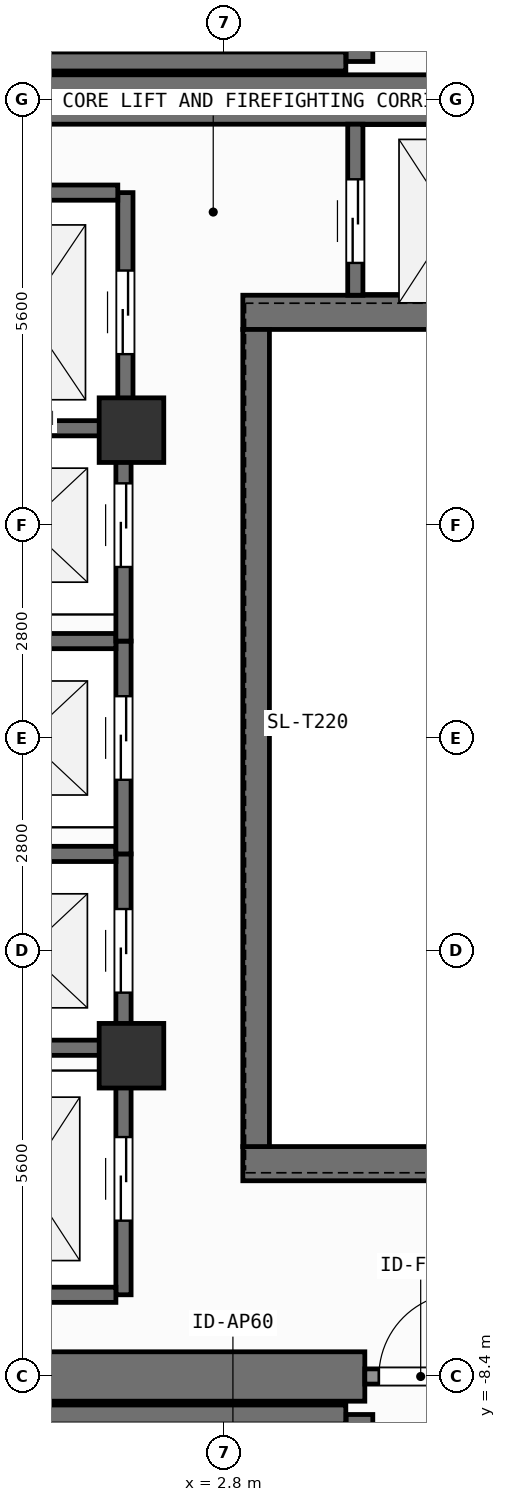
"""IFC4 building model, lengths in metres.
Left out: names, types, materials, properties, quantities, classifications, styles, units other than length and angle.
Written with IfcOpenShell. Run it as: python <this file> out.ifc"""

import sys

from ifc_helpers import new_model, si_unit, direction, frame, frame_2d, origin, origin_2d, place, context, subcontext, project, spatial, rectangle, extrude, element, fill, save


model = new_model("IFC4")
c1 = context("Model", 3, precision=1e-05, world=origin(), true_north=direction((0.0, 1.0)))
c2 = subcontext(c1, "Body", "Model", "MODEL_VIEW")
j1 = project(units=[si_unit("LENGTHUNIT", "METRE"), si_unit("PLANEANGLEUNIT", "RADIAN")], contexts=[c1])
p1 = place(None, origin())
s1 = spatial("IfcSite", under=j1, at=p1, CompositionType="ELEMENT")
p2 = place(p1, origin())
s2 = spatial("IfcBuilding", under=s1, at=p2, CompositionType="ELEMENT")
p3 = place(p2, frame((0.0, 0.0, 270.3)))
s3 = spatial("IfcBuildingStorey", under=s2, at=p3, CompositionType="ELEMENT", Elevation=270.3)
p4 = place(p3, frame((-2.62, -8.4, 0.0), z_axis=(0.0, 0.0, 1.0), x_axis=(1.0, 0.0, 0.0)))
e1 = element("IfcWall", 1, at=p4, inside=s3, PredefinedType="SHEAR", context=c2, shape_type="SweptSolid", body=[
    extrude(rectangle(XDim=7.27, YDim=0.65, at=frame_2d((3.635, 0.0))), origin(), (0.0, 0.0, 1.0), 3.9),
])
p5 = place(p3, frame((-7.55, 8.4, 0.0), z_axis=(0.0, 0.0, 1.0), x_axis=(1.0, 0.0, 0.0)))
e2 = element("IfcWall", 2, at=p5, inside=s3, PredefinedType="SHEAR", context=c2, shape_type="SweptSolid", body=[
    extrude(rectangle(XDim=16.275, YDim=0.65, at=frame_2d((8.138, 0.0))), origin(), (0.0, 0.0, 1.0), 3.9),
])
for number, where, z_axis, x_axis in (
    (3, (3.045, -5.6, 0.0), (0.0, 0.0, 1.0), (1.0, 0.0, 0.0)),
    (4, (3.045, 5.6, 0.0), (0.0, 0.0, 1.0), (1.0, 0.0, 0.0)),
):
    element("IfcWall", number, at=place(p3, frame(where, z_axis=z_axis, x_axis=x_axis)), inside=s3, PredefinedType="SHEAR", context=c2, shape_type="SweptSolid", body=[
        extrude(rectangle(XDim=5.68, YDim=0.45, at=frame_2d((2.84, 0.0))), origin(), (0.0, 0.0, 1.0), 3.9),
    ])
p6 = place(p3, frame((3.22, -5.375, 0.0), z_axis=(0.0, 0.0, 1.0), x_axis=(0.0, 1.0, 0.0)))
e5 = element("IfcWall", 5, at=p6, inside=s3, PredefinedType="SHEAR", context=c2, shape_type="SweptSolid", body=[
    extrude(rectangle(XDim=10.75, YDim=0.35, at=frame_2d((5.375, 0.0))), origin(), (0.0, 0.0, 1.0), 3.9),
])
p7 = place(p3, frame((-2.2, -8.9, 0.0), z_axis=(0.0, 0.0, 1.0), x_axis=(1.0, 0.0, 0.0)))
e6 = element("IfcWall", 6, at=p7, inside=s3, PredefinedType="SHEAR", context=c2, shape_type="SweptSolid", body=[
    extrude(rectangle(XDim=6.6, YDim=0.25, at=frame_2d((3.3, 0.0))), origin(), (0.0, 0.0, 1.0), 3.9),
])
p8 = place(p3, frame((4.58, -8.9, 0.0), z_axis=(0.0, 0.0, 1.0), x_axis=(0.0, -1.0, 0.0)))
e7 = element("IfcWall", 7, at=p8, inside=s3, PredefinedType="SHEAR", context=c2, shape_type="SweptSolid", body=[
    extrude(rectangle(XDim=2.925, YDim=0.35, at=frame_2d((1.462, 0.0))), origin(), (0.0, 0.0, 1.0), 3.9),
])
p9 = place(p8, frame((0.913, 0.0, 0.0)))
e8 = element("IfcOpeningElement", 8, at=p9, cuts=e7, PredefinedType="OPENING", context=c2, shape_type="SweptSolid", body=[
    extrude(rectangle(XDim=1.1, YDim=2.15, at=frame_2d((0.55, 1.075))), frame((0.0, 0.185, 0.0), z_axis=(0.0, -1.0, 0.0), x_axis=(1.0, 0.0, 0.0)), (0.0, 0.0, 1.0), 0.37),
])
p10 = place(p3, frame((-2.2, 8.9, 0.0), z_axis=(0.0, 0.0, 1.0), x_axis=(1.0, 0.0, 0.0)))
e9 = element("IfcWall", 9, at=p10, inside=s3, PredefinedType="SHEAR", context=c2, shape_type="SweptSolid", body=[
    extrude(rectangle(XDim=6.6, YDim=0.25, at=frame_2d((3.3, 0.0))), origin(), (0.0, 0.0, 1.0), 3.9),
])
p11 = place(p3, frame((4.58, 11.825, 0.0), z_axis=(0.0, 0.0, 1.0), x_axis=(0.0, -1.0, 0.0)))
e10 = element("IfcWall", 10, at=p11, inside=s3, PredefinedType="SHEAR", context=c2, shape_type="SweptSolid", body=[
    extrude(rectangle(XDim=2.925, YDim=0.35, at=frame_2d((1.462, 0.0))), origin(), (0.0, 0.0, 1.0), 3.9),
])
p12 = place(p11, frame((0.913, 0.0, 0.0)))
e11 = element("IfcOpeningElement", 11, at=p12, cuts=e10, PredefinedType="OPENING", context=c2, shape_type="SweptSolid", body=[
    extrude(rectangle(XDim=1.1, YDim=2.15, at=frame_2d((0.55, 1.075))), frame((0.0, 0.185, 0.0), z_axis=(0.0, -1.0, 0.0), x_axis=(1.0, 0.0, 0.0)), (0.0, 0.0, 1.0), 0.37),
])
for number, where, z_axis, x_axis in (
    (12, (1.58, -4.18, 0.0), (0.0, 0.0, 1.0), (1.0, 0.0, 0.0)),
    (13, (1.58, 4.05, 0.0), (0.0, 0.0, 1.0), (1.0, 0.0, 0.0)),
):
    element("IfcColumn", number, at=place(p3, frame(where, z_axis=z_axis, x_axis=x_axis)), inside=s3, PredefinedType="COLUMN", context=c2, shape_type="SweptSolid", body=[
        extrude(rectangle(XDim=0.85, YDim=0.85, at=origin_2d()), origin(), (0.0, 0.0, 1.0), 3.9),
    ])
p13 = place(p3, frame((1.475, -4.275, 0.0), z_axis=(0.0, 0.0, 1.0), x_axis=(0.0, 1.0, 0.0)))
e14 = element("IfcWall", 14, at=p13, inside=s3, PredefinedType="SHEAR", context=c2, shape_type="SweptSolid", body=[
    extrude(rectangle(XDim=2.75, YDim=0.2, at=frame_2d((1.375, 0.0))), origin(), (0.0, 0.0, 1.0), 3.68),
])
p14 = place(p13, frame((0.925, 0.0, 0.0)))
e15 = element("IfcOpeningElement", 15, at=p14, cuts=e14, PredefinedType="OPENING", context=c2, shape_type="SweptSolid", body=[
    extrude(rectangle(XDim=1.1, YDim=2.2, at=frame_2d((0.55, 1.1))), frame((0.0, 0.11, 0.0), z_axis=(0.0, -1.0, 0.0), x_axis=(1.0, 0.0, 0.0)), (0.0, 0.0, 1.0), 0.22),
])
for number, where, z_axis, x_axis in (
    (16, (-0.975, -4.075, 0.0), (0.0, 0.0, 1.0), (1.0, 0.0, 0.0)),
    (17, (-0.975, -1.525, 0.0), (0.0, 0.0, 1.0), (1.0, 0.0, 0.0)),
):
    element("IfcWall", number, at=place(p3, frame(where, z_axis=z_axis, x_axis=x_axis)), inside=s3, PredefinedType="SHEAR", context=c2, shape_type="SweptSolid", body=[
        extrude(rectangle(XDim=2.35, YDim=0.2, at=frame_2d((1.175, 0.0))), origin(), (0.0, 0.0, 1.0), 3.68),
    ])
p15 = place(p3, frame((1.475, -1.525, 0.0), z_axis=(0.0, 0.0, 1.0), x_axis=(0.0, 1.0, 0.0)))
e18 = element("IfcWall", 18, at=p15, inside=s3, PredefinedType="SHEAR", context=c2, shape_type="SweptSolid", body=[
    extrude(rectangle(XDim=2.8, YDim=0.2, at=frame_2d((1.4, 0.0))), origin(), (0.0, 0.0, 1.0), 3.68),
])
p16 = place(p15, frame((0.975, 0.0, 0.0)))
e19 = element("IfcOpeningElement", 19, at=p16, cuts=e18, PredefinedType="OPENING", context=c2, shape_type="SweptSolid", body=[
    extrude(rectangle(XDim=1.1, YDim=2.2, at=frame_2d((0.55, 1.1))), frame((0.0, 0.11, 0.0), z_axis=(0.0, -1.0, 0.0), x_axis=(1.0, 0.0, 0.0)), (0.0, 0.0, 1.0), 0.22),
])
p17 = place(p3, frame((-0.975, 1.275, 0.0), z_axis=(0.0, 0.0, 1.0), x_axis=(1.0, 0.0, 0.0)))
e20 = element("IfcWall", 20, at=p17, inside=s3, PredefinedType="SHEAR", context=c2, shape_type="SweptSolid", body=[
    extrude(rectangle(XDim=2.35, YDim=0.2, at=frame_2d((1.175, 0.0))), origin(), (0.0, 0.0, 1.0), 3.68),
])
p18 = place(p3, frame((1.475, 1.275, 0.0), z_axis=(0.0, 0.0, 1.0), x_axis=(0.0, 1.0, 0.0)))
e21 = element("IfcWall", 21, at=p18, inside=s3, PredefinedType="SHEAR", context=c2, shape_type="SweptSolid", body=[
    extrude(rectangle(XDim=2.8, YDim=0.2, at=frame_2d((1.4, 0.0))), origin(), (0.0, 0.0, 1.0), 3.68),
])
p19 = place(p18, frame((0.975, 0.0, 0.0)))
e22 = element("IfcOpeningElement", 22, at=p19, cuts=e21, PredefinedType="OPENING", context=c2, shape_type="SweptSolid", body=[
    extrude(rectangle(XDim=1.1, YDim=2.2, at=frame_2d((0.55, 1.1))), frame((0.0, 0.11, 0.0), z_axis=(0.0, -1.0, 0.0), x_axis=(1.0, 0.0, 0.0)), (0.0, 0.0, 1.0), 0.22),
])
p20 = place(p3, frame((-0.975, 4.075, 0.0), z_axis=(0.0, 0.0, 1.0), x_axis=(1.0, 0.0, 0.0)))
e23 = element("IfcWall", 23, at=p20, inside=s3, PredefinedType="SHEAR", context=c2, shape_type="SweptSolid", body=[
    extrude(rectangle(XDim=2.35, YDim=0.2, at=frame_2d((1.175, 0.0))), origin(), (0.0, 0.0, 1.0), 3.68),
])
p21 = place(p3, frame((1.5, 4.025, 0.0), z_axis=(0.0, 0.0, 1.0), x_axis=(0.0, 1.0, 0.0)))
e24 = element("IfcWall", 24, at=p21, inside=s3, PredefinedType="SHEAR", context=c2, shape_type="SweptSolid", body=[
    extrude(rectangle(XDim=3.15, YDim=0.2, at=frame_2d((1.575, 0.0))), origin(), (0.0, 0.0, 1.0), 3.68),
])
p22 = place(p21, frame((1.025, 0.0, 0.0)))
e25 = element("IfcOpeningElement", 25, at=p22, cuts=e24, PredefinedType="OPENING", context=c2, shape_type="SweptSolid", body=[
    extrude(rectangle(XDim=1.1, YDim=2.2, at=frame_2d((0.55, 1.1))), frame((0.0, 0.11, 0.0), z_axis=(0.0, -1.0, 0.0), x_axis=(1.0, 0.0, 0.0)), (0.0, 0.0, 1.0), 0.22),
])
p23 = place(p3, frame((-1.0, 7.175, 0.0), z_axis=(0.0, 0.0, 1.0), x_axis=(1.0, 0.0, 0.0)))
e26 = element("IfcWall", 26, at=p23, inside=s3, PredefinedType="SHEAR", context=c2, shape_type="SweptSolid", body=[
    extrude(rectangle(XDim=2.4, YDim=0.2, at=frame_2d((1.2, 0.0))), origin(), (0.0, 0.0, 1.0), 3.68),
])
p24 = place(p3, frame((1.475, -7.325, 0.0), z_axis=(0.0, 0.0, 1.0), x_axis=(0.0, 1.0, 0.0)))
e27 = element("IfcWall", 27, at=p24, inside=s3, PredefinedType="SHEAR", context=c2, shape_type="SweptSolid", body=[
    extrude(rectangle(XDim=3.05, YDim=0.2, at=frame_2d((1.525, 0.0))), origin(), (0.0, 0.0, 1.0), 3.68),
])
p25 = place(p24, frame((0.975, 0.0, 0.0)))
e28 = element("IfcOpeningElement", 28, at=p25, cuts=e27, PredefinedType="OPENING", context=c2, shape_type="SweptSolid", body=[
    extrude(rectangle(XDim=1.1, YDim=2.2, at=frame_2d((0.55, 1.1))), frame((0.0, 0.11, 0.0), z_axis=(0.0, -1.0, 0.0), x_axis=(1.0, 0.0, 0.0)), (0.0, 0.0, 1.0), 0.22),
])
p26 = place(p3, frame((-0.975, -7.325, 0.0), z_axis=(0.0, 0.0, 1.0), x_axis=(1.0, 0.0, 0.0)))
e29 = element("IfcWall", 29, at=p26, inside=s3, PredefinedType="SHEAR", context=c2, shape_type="SweptSolid", body=[
    extrude(rectangle(XDim=2.35, YDim=0.2, at=frame_2d((1.175, 0.0))), origin(), (0.0, 0.0, 1.0), 3.68),
])
p27 = place(p3, frame((4.525, 5.825, 0.0), z_axis=(0.0, 0.0, 1.0), x_axis=(0.0, 1.0, 0.0)))
e30 = element("IfcWall", 30, at=p27, inside=s3, PredefinedType="SHEAR", context=c2, shape_type="SweptSolid", body=[
    extrude(rectangle(XDim=2.25, YDim=0.2, at=frame_2d((1.125, 0.0))), origin(), (0.0, 0.0, 1.0), 3.68),
])
p28 = place(p27, frame((0.425, 0.0, 0.0)))
e31 = element("IfcOpeningElement", 31, at=p28, cuts=e30, PredefinedType="OPENING", context=c2, shape_type="SweptSolid", body=[
    extrude(rectangle(XDim=1.1, YDim=2.2, at=frame_2d((0.55, 1.1))), frame((0.0, 0.11, 0.0), z_axis=(0.0, -1.0, 0.0), x_axis=(1.0, 0.0, 0.0)), (0.0, 0.0, 1.0), 0.22),
])
p29 = place(p3, frame((4.65, -8.4, 0.0), z_axis=(0.0, 0.0, 1.0), x_axis=(1.0, 0.0, 0.0)))
e32 = element("IfcWall", 32, at=p29, inside=s3, PredefinedType="SOLIDWALL", context=c2, shape_type="SweptSolid", body=[
    extrude(rectangle(XDim=1.47, YDim=0.2, at=frame_2d((0.735, 0.0))), origin(), (0.0, 0.0, 1.0), 2.92),
])
p30 = place(p29, frame((0.185, 0.0, 0.0)))
e33 = element("IfcOpeningElement", 33, at=p30, cuts=e32, PredefinedType="OPENING", context=c2, shape_type="SweptSolid", body=[
    extrude(rectangle(XDim=1.1, YDim=2.15, at=frame_2d((0.55, 1.075))), frame((0.0, 0.11, 0.0), z_axis=(0.0, -1.0, 0.0), x_axis=(1.0, 0.0, 0.0)), (0.0, 0.0, 1.0), 0.22),
])
p31 = place(p14, origin())
e34 = element("IfcDoor", 34, at=p31, inside=s3, OperationType="SLIDING_TO_LEFT", PredefinedType="DOOR", context=c2, shape_type="SweptSolid", body=[
    extrude(rectangle(XDim=1.1, YDim=2.2, at=frame_2d((0.55, 1.1))), frame((0.0, 0.025, 0.0), z_axis=(0.0, -1.0, 0.0), x_axis=(1.0, 0.0, 0.0)), (0.0, 0.0, 1.0), 0.05),
])
fill(e15, e34)
p32 = place(p16, origin())
e35 = element("IfcDoor", 35, at=p32, inside=s3, OperationType="SLIDING_TO_LEFT", PredefinedType="DOOR", context=c2, shape_type="SweptSolid", body=[
    extrude(rectangle(XDim=1.1, YDim=2.2, at=frame_2d((0.55, 1.1))), frame((0.0, 0.025, 0.0), z_axis=(0.0, -1.0, 0.0), x_axis=(1.0, 0.0, 0.0)), (0.0, 0.0, 1.0), 0.05),
])
fill(e19, e35)
p33 = place(p19, origin())
e36 = element("IfcDoor", 36, at=p33, inside=s3, OperationType="SLIDING_TO_LEFT", PredefinedType="DOOR", context=c2, shape_type="SweptSolid", body=[
    extrude(rectangle(XDim=1.1, YDim=2.2, at=frame_2d((0.55, 1.1))), frame((0.0, 0.025, 0.0), z_axis=(0.0, -1.0, 0.0), x_axis=(1.0, 0.0, 0.0)), (0.0, 0.0, 1.0), 0.05),
])
fill(e22, e36)
p34 = place(p22, origin())
e37 = element("IfcDoor", 37, at=p34, inside=s3, OperationType="SLIDING_TO_LEFT", PredefinedType="DOOR", context=c2, shape_type="SweptSolid", body=[
    extrude(rectangle(XDim=1.1, YDim=2.2, at=frame_2d((0.55, 1.1))), frame((0.0, 0.025, 0.0), z_axis=(0.0, -1.0, 0.0), x_axis=(1.0, 0.0, 0.0)), (0.0, 0.0, 1.0), 0.05),
])
fill(e25, e37)
p35 = place(p25, origin())
e38 = element("IfcDoor", 38, at=p35, inside=s3, OperationType="SLIDING_TO_LEFT", PredefinedType="DOOR", context=c2, shape_type="SweptSolid", body=[
    extrude(rectangle(XDim=1.1, YDim=2.2, at=frame_2d((0.55, 1.1))), frame((0.0, 0.025, 0.0), z_axis=(0.0, -1.0, 0.0), x_axis=(1.0, 0.0, 0.0)), (0.0, 0.0, 1.0), 0.05),
])
fill(e28, e38)
p36 = place(p28, origin())
e39 = element("IfcDoor", 39, at=p36, inside=s3, OperationType="SLIDING_TO_LEFT", PredefinedType="DOOR", context=c2, shape_type="SweptSolid", body=[
    extrude(rectangle(XDim=1.1, YDim=2.2, at=frame_2d((0.55, 1.1))), frame((0.0, 0.025, 0.0), z_axis=(0.0, -1.0, 0.0), x_axis=(1.0, 0.0, 0.0)), (0.0, 0.0, 1.0), 0.05),
])
fill(e31, e39)
p37 = place(p30, origin())
e40 = element("IfcDoor", 40, at=p37, inside=s3, OperationType="SINGLE_SWING_RIGHT", PredefinedType="DOOR", context=c2, shape_type="SweptSolid", body=[
    extrude(rectangle(XDim=1.1, YDim=2.15, at=frame_2d((0.55, 1.075))), frame((0.0, 0.025, 0.0), z_axis=(0.0, -1.0, 0.0), x_axis=(1.0, 0.0, 0.0)), (0.0, 0.0, 1.0), 0.05),
])
fill(e33, e40)
save(model, sys.argv[1])
